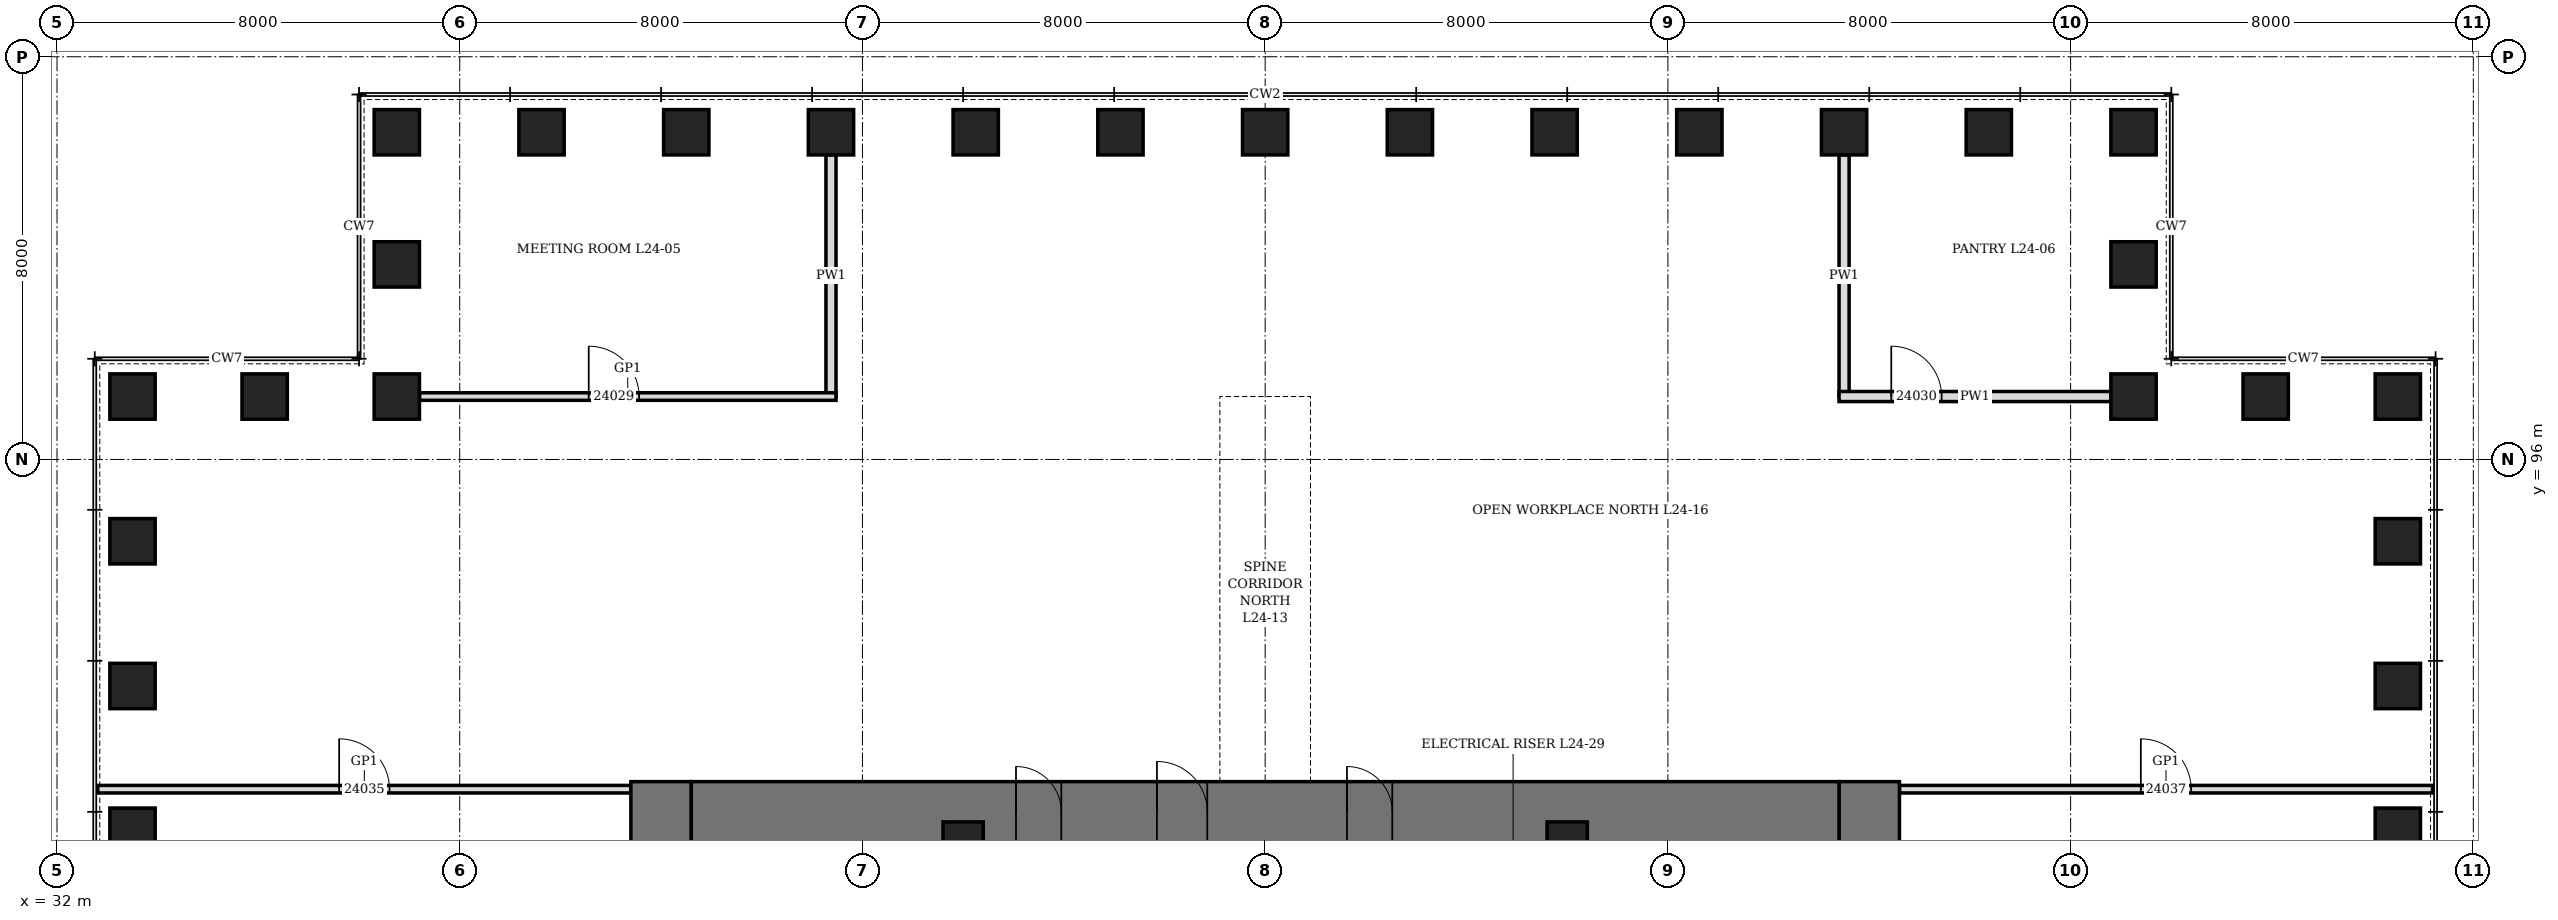
"""IFC4 building model, lengths in metres.
Left out: names, types, materials, properties, quantities, classifications, styles, units other than length and angle.
Written with IfcOpenShell. Run it as: python <this file> out.ifc"""

import sys

from ifc_helpers import new_model, si_unit, direction, frame, frame_2d, origin, origin_2d, place, context, subcontext, project, spatial, rectangle, hollow_rectangle, extrude, element, fill, save


model = new_model("IFC4")
c1 = context("Model", 3, precision=1e-05, world=origin(), true_north=direction((0.0, 1.0)))
c2 = subcontext(c1, "Body", "Model", "MODEL_VIEW")
j1 = project(units=[si_unit("LENGTHUNIT", "METRE"), si_unit("PLANEANGLEUNIT", "RADIAN")], contexts=[c1])
p1 = place(None, origin())
s1 = spatial("IfcSite", under=j1, at=p1, CompositionType="ELEMENT")
p2 = place(p1, origin())
s2 = spatial("IfcBuilding", under=s1, at=p2, CompositionType="ELEMENT")
p3 = place(p2, frame((0.0, 0.0, 112.3)))
s3 = spatial("IfcBuildingStorey", under=s2, at=p3, CompositionType="ELEMENT", Elevation=112.3)
for number, where, z_axis, x_axis in (
    (1, (78.5, 88.625, 0.0), (0.0, 0.0, 1.0), (0.0, 1.0, 0.0)),
    (2, (78.5, 91.5, 0.0), (0.0, 0.0, 1.0), (0.0, 1.0, 0.0)),
    (3, (78.5, 94.375, 0.0), (0.0, 0.0, 1.0), (0.0, 1.0, 0.0)),
    (4, (78.5, 97.25, 0.0), (0.0, 0.0, 1.0), (1.0, 0.0, 0.0)),
    (5, (75.875, 97.25, 0.0), (0.0, 0.0, 1.0), (1.0, 0.0, 0.0)),
    (6, (73.25, 97.25, 0.0), (0.0, 0.0, 1.0), (0.0, 1.0, 0.0)),
    (7, (73.25, 99.875, 0.0), (0.0, 0.0, 1.0), (0.0, 1.0, 0.0)),
    (8, (73.25, 102.5, 0.0), (0.0, 0.0, 1.0), (1.0, 0.0, 0.0)),
    (9, (70.375, 102.5, 0.0), (0.0, 0.0, 1.0), (1.0, 0.0, 0.0)),
    (10, (67.5, 102.5, 0.0), (0.0, 0.0, 1.0), (1.0, 0.0, 0.0)),
    (11, (64.625, 102.5, 0.0), (0.0, 0.0, 1.0), (1.0, 0.0, 0.0)),
    (12, (61.75, 102.5, 0.0), (0.0, 0.0, 1.0), (1.0, 0.0, 0.0)),
    (13, (58.875, 102.5, 0.0), (0.0, 0.0, 1.0), (1.0, 0.0, 0.0)),
    (14, (56.0, 102.5, 0.0), (0.0, 0.0, 1.0), (1.0, 0.0, 0.0)),
    (15, (53.125, 102.5, 0.0), (0.0, 0.0, 1.0), (1.0, 0.0, 0.0)),
    (16, (50.25, 102.5, 0.0), (0.0, 0.0, 1.0), (1.0, 0.0, 0.0)),
    (17, (47.375, 102.5, 0.0), (0.0, 0.0, 1.0), (1.0, 0.0, 0.0)),
    (18, (44.5, 102.5, 0.0), (0.0, 0.0, 1.0), (1.0, 0.0, 0.0)),
    (19, (41.625, 102.5, 0.0), (0.0, 0.0, 1.0), (1.0, 0.0, 0.0)),
    (20, (38.75, 102.5, 0.0), (0.0, 0.0, 1.0), (0.0, 1.0, 0.0)),
    (21, (38.75, 99.875, 0.0), (0.0, 0.0, 1.0), (0.0, 1.0, 0.0)),
    (22, (38.75, 97.25, 0.0), (0.0, 0.0, 1.0), (1.0, 0.0, 0.0)),
    (23, (36.125, 97.25, 0.0), (0.0, 0.0, 1.0), (1.0, 0.0, 0.0)),
    (24, (33.5, 97.25, 0.0), (0.0, 0.0, 1.0), (0.0, 1.0, 0.0)),
    (25, (33.5, 94.375, 0.0), (0.0, 0.0, 1.0), (0.0, 1.0, 0.0)),
    (26, (33.5, 91.5, 0.0), (0.0, 0.0, 1.0), (0.0, 1.0, 0.0)),
    (27, (33.5, 88.625, 0.0), (0.0, 0.0, 1.0), (0.0, 1.0, 0.0)),
):
    element("IfcColumn", number, at=place(p3, frame(where, z_axis=z_axis, x_axis=x_axis)), inside=s3, PredefinedType="COLUMN", context=c2, shape_type="SweptSolid", body=[
        extrude(hollow_rectangle(XDim=0.9, YDim=0.9, WallThickness=0.15, at=origin_2d()), origin(), (0.0, 0.0, 1.0), 4.2),
    ])
p4 = place(p3, frame((44.0, 70.4, 0.0), z_axis=(0.0, 0.0, 1.0), x_axis=(0.0, 1.0, 0.0)))
e28 = element("IfcWall", 28, at=p4, inside=s3, PredefinedType="SHEAR", context=c2, shape_type="SweptSolid", body=[
    extrude(rectangle(XDim=19.2, YDim=1.2, at=frame_2d((9.6, 0.0))), origin(), (0.0, 0.0, 1.0), 4.2),
])
p5 = place(p4, frame((8.6, 0.0, 0.0)))
e29 = element("IfcOpeningElement", 29, at=p5, cuts=e28, PredefinedType="OPENING", context=c2, shape_type="SweptSolid", body=[
    extrude(rectangle(XDim=2.0, YDim=2.4, at=frame_2d((1.0, 1.2))), frame((0.0, 0.61, 0.0), z_axis=(0.0, -1.0, 0.0), x_axis=(1.0, 0.0, 0.0)), (0.0, 0.0, 1.0), 1.22),
])
p6 = place(p3, frame((68.0, 70.4, 0.0), z_axis=(0.0, 0.0, 1.0), x_axis=(0.0, 1.0, 0.0)))
e30 = element("IfcWall", 30, at=p6, inside=s3, PredefinedType="SHEAR", context=c2, shape_type="SweptSolid", body=[
    extrude(rectangle(XDim=19.2, YDim=1.2, at=frame_2d((9.6, 0.0))), origin(), (0.0, 0.0, 1.0), 4.2),
])
p7 = place(p6, frame((8.6, 0.0, 0.0)))
e31 = element("IfcOpeningElement", 31, at=p7, cuts=e30, PredefinedType="OPENING", context=c2, shape_type="SweptSolid", body=[
    extrude(rectangle(XDim=2.0, YDim=2.4, at=frame_2d((1.0, 1.2))), frame((0.0, 0.61, 0.0), z_axis=(0.0, -1.0, 0.0), x_axis=(1.0, 0.0, 0.0)), (0.0, 0.0, 1.0), 1.22),
])
p8 = place(p3, frame((44.6, 89.0, 0.0), z_axis=(0.0, 0.0, 1.0), x_axis=(1.0, 0.0, 0.0)))
e32 = element("IfcWall", 32, at=p8, inside=s3, PredefinedType="SHEAR", context=c2, shape_type="SweptSolid", body=[
    extrude(rectangle(XDim=22.8, YDim=1.2, at=frame_2d((11.4, 0.0))), origin(), (0.0, 0.0, 1.0), 4.2),
])
p9 = place(p8, frame((9.25, 0.0, 0.0)))
e33 = element("IfcOpeningElement", 33, at=p9, cuts=e32, PredefinedType="OPENING", context=c2, shape_type="SweptSolid", body=[
    extrude(rectangle(XDim=1.0, YDim=2.1, at=frame_2d((0.5, 1.05))), frame((0.0, 0.61, 0.0), z_axis=(0.0, -1.0, 0.0), x_axis=(1.0, 0.0, 0.0)), (0.0, 0.0, 1.0), 1.22),
])
p10 = place(p8, frame((6.45, 0.0, 0.0)))
e34 = element("IfcOpeningElement", 34, at=p10, cuts=e32, PredefinedType="OPENING", context=c2, shape_type="SweptSolid", body=[
    extrude(rectangle(XDim=0.9, YDim=2.1, at=frame_2d((0.45, 1.05))), frame((0.0, 0.61, 0.0), z_axis=(0.0, -1.0, 0.0), x_axis=(1.0, 0.0, 0.0)), (0.0, 0.0, 1.0), 1.22),
])
p11 = place(p8, frame((13.025, 0.0, 0.0)))
e35 = element("IfcOpeningElement", 35, at=p11, cuts=e32, PredefinedType="OPENING", context=c2, shape_type="SweptSolid", body=[
    extrude(rectangle(XDim=0.9, YDim=2.1, at=frame_2d((0.45, 1.05))), frame((0.0, 0.61, 0.0), z_axis=(0.0, -1.0, 0.0), x_axis=(1.0, 0.0, 0.0)), (0.0, 0.0, 1.0), 1.22),
])
for number, where, z_axis, x_axis in (
    (36, (50.0, 88.4, 0.0), (0.0, 0.0, 1.0), (1.0, 0.0, 0.0)),
    (37, (62.0, 88.4, 0.0), (0.0, 0.0, 1.0), (1.0, 0.0, 0.0)),
):
    element("IfcColumn", number, at=place(p3, frame(where, z_axis=z_axis, x_axis=x_axis)), inside=s3, PredefinedType="COLUMN", context=c2, shape_type="SweptSolid", body=[
        extrude(hollow_rectangle(XDim=0.8, YDim=0.8, WallThickness=0.1, at=origin_2d()), origin(), (0.0, 0.0, 1.0), 4.2),
    ])
p12 = place(p3, frame((47.375, 97.25, 0.0), z_axis=(0.0, 0.0, 1.0), x_axis=(0.0, 1.0, 0.0)))
e38 = element("IfcWall", 38, at=p12, inside=s3, PredefinedType="PARTITIONING", context=c2, shape_type="SweptSolid", body=[
    extrude(rectangle(XDim=4.8, YDim=0.2, at=frame_2d((2.4, 0.0))), origin(), (0.0, 0.0, 1.0), 3.278),
])
p13 = place(p3, frame((67.5, 97.25, 0.0), z_axis=(0.0, 0.0, 1.0), x_axis=(0.0, 1.0, 0.0)))
e39 = element("IfcWall", 39, at=p13, inside=s3, PredefinedType="PARTITIONING", context=c2, shape_type="SweptSolid", body=[
    extrude(rectangle(XDim=4.8, YDim=0.2, at=frame_2d((2.4, 0.0))), origin(), (0.0, 0.0, 1.0), 2.74),
])
p14 = place(p3, frame((32.81, 89.45, 0.0), z_axis=(0.0, 0.0, 1.0), x_axis=(1.0, 0.0, 0.0)))
e40 = element("IfcWall", 40, at=p14, inside=s3, PredefinedType="PARTITIONING", context=c2, shape_type="SweptSolid", body=[
    extrude(rectangle(XDim=10.59, YDim=0.15, at=frame_2d((5.295, 0.0))), origin(), (0.0, 0.0, 1.0), 4.04),
])
p15 = place(p14, frame((4.795, 0.0, 0.0)))
e41 = element("IfcOpeningElement", 41, at=p15, cuts=e40, PredefinedType="OPENING", context=c2, shape_type="SweptSolid", body=[
    extrude(rectangle(XDim=1.0, YDim=2.4, at=frame_2d((0.5, 1.2))), frame((0.0, 0.085, 0.0), z_axis=(0.0, -1.0, 0.0), x_axis=(1.0, 0.0, 0.0)), (0.0, 0.0, 1.0), 0.17),
])
p16 = place(p3, frame((68.6, 89.45, 0.0), z_axis=(0.0, 0.0, 1.0), x_axis=(1.0, 0.0, 0.0)))
e42 = element("IfcWall", 42, at=p16, inside=s3, PredefinedType="PARTITIONING", context=c2, shape_type="SweptSolid", body=[
    extrude(rectangle(XDim=10.59, YDim=0.15, at=frame_2d((5.295, 0.0))), origin(), (0.0, 0.0, 1.0), 4.04),
])
p17 = place(p16, frame((4.795, 0.0, 0.0)))
e43 = element("IfcOpeningElement", 43, at=p17, cuts=e42, PredefinedType="OPENING", context=c2, shape_type="SweptSolid", body=[
    extrude(rectangle(XDim=1.0, YDim=2.4, at=frame_2d((0.5, 1.2))), frame((0.0, 0.085, 0.0), z_axis=(0.0, -1.0, 0.0), x_axis=(1.0, 0.0, 0.0)), (0.0, 0.0, 1.0), 0.17),
])
p18 = place(p3, frame((39.2, 97.25, 0.0), z_axis=(0.0, 0.0, 1.0), x_axis=(1.0, 0.0, 0.0)))
e44 = element("IfcWall", 44, at=p18, inside=s3, PredefinedType="PARTITIONING", context=c2, shape_type="SweptSolid", body=[
    extrude(rectangle(XDim=8.275, YDim=0.15, at=frame_2d((4.138, 0.0))), origin(), (0.0, 0.0, 1.0), 4.04),
])
p19 = place(p18, frame((3.363, 0.0, 0.0)))
e45 = element("IfcOpeningElement", 45, at=p19, cuts=e44, PredefinedType="OPENING", context=c2, shape_type="SweptSolid", body=[
    extrude(rectangle(XDim=1.0, YDim=2.4, at=frame_2d((0.5, 1.2))), frame((0.0, 0.085, 0.0), z_axis=(0.0, -1.0, 0.0), x_axis=(1.0, 0.0, 0.0)), (0.0, 0.0, 1.0), 0.17),
])
p20 = place(p3, frame((67.4, 97.25, 0.0), z_axis=(0.0, 0.0, 1.0), x_axis=(1.0, 0.0, 0.0)))
e46 = element("IfcWall", 46, at=p20, inside=s3, PredefinedType="PARTITIONING", context=c2, shape_type="SweptSolid", body=[
    extrude(rectangle(XDim=5.4, YDim=0.2, at=frame_2d((2.7, 0.0))), origin(), (0.0, 0.0, 1.0), 4.04),
])
p21 = place(p20, frame((1.038, 0.0, 0.0)))
e47 = element("IfcOpeningElement", 47, at=p21, cuts=e46, PredefinedType="OPENING", context=c2, shape_type="SweptSolid", body=[
    extrude(rectangle(XDim=1.0, YDim=2.1, at=frame_2d((0.5, 1.05))), frame((0.0, 0.11, 0.0), z_axis=(0.0, -1.0, 0.0), x_axis=(1.0, 0.0, 0.0)), (0.0, 0.0, 1.0), 0.22),
])
p22 = place(p9, origin())
e48 = element("IfcDoor", 48, at=p22, inside=s3, OperationType="SINGLE_SWING_LEFT", PredefinedType="DOOR", context=c2, shape_type="SweptSolid", body=[
    extrude(rectangle(XDim=1.0, YDim=2.1, at=frame_2d((0.5, 1.05))), frame((0.0, 0.35, 0.0), z_axis=(0.0, -1.0, 0.0), x_axis=(1.0, 0.0, 0.0)), (0.0, 0.0, 1.0), 0.7),
])
fill(e33, e48)
p23 = place(p10, origin())
e49 = element("IfcDoor", 49, at=p23, inside=s3, OperationType="SINGLE_SWING_LEFT", PredefinedType="DOOR", context=c2, shape_type="SweptSolid", body=[
    extrude(rectangle(XDim=0.9, YDim=2.1, at=frame_2d((0.45, 1.05))), frame((0.0, 0.35, 0.0), z_axis=(0.0, -1.0, 0.0), x_axis=(1.0, 0.0, 0.0)), (0.0, 0.0, 1.0), 0.7),
])
fill(e34, e49)
p24 = place(p11, origin())
e50 = element("IfcDoor", 50, at=p24, inside=s3, OperationType="SINGLE_SWING_LEFT", PredefinedType="DOOR", context=c2, shape_type="SweptSolid", body=[
    extrude(rectangle(XDim=0.9, YDim=2.1, at=frame_2d((0.45, 1.05))), frame((0.0, 0.35, 0.0), z_axis=(0.0, -1.0, 0.0), x_axis=(1.0, 0.0, 0.0)), (0.0, 0.0, 1.0), 0.7),
])
fill(e35, e50)
p25 = place(p19, origin())
e51 = element("IfcDoor", 51, at=p25, inside=s3, OperationType="SINGLE_SWING_RIGHT", PredefinedType="DOOR", context=c2, shape_type="SweptSolid", body=[
    extrude(rectangle(XDim=1.0, YDim=2.4, at=frame_2d((0.5, 1.2))), frame((0.0, 0.075, 0.0), z_axis=(0.0, -1.0, 0.0), x_axis=(1.0, 0.0, 0.0)), (0.0, 0.0, 1.0), 0.149),
])
fill(e45, e51)
p26 = place(p21, origin())
e52 = element("IfcDoor", 52, at=p26, inside=s3, OperationType="SINGLE_SWING_LEFT", PredefinedType="DOOR", context=c2, shape_type="SweptSolid", body=[
    extrude(rectangle(XDim=1.0, YDim=2.1, at=frame_2d((0.5, 1.05))), frame((0.0, 0.1, 0.0), z_axis=(0.0, -1.0, 0.0), x_axis=(1.0, 0.0, 0.0)), (0.0, 0.0, 1.0), 0.199),
])
fill(e47, e52)
p27 = place(p15, origin())
e53 = element("IfcDoor", 53, at=p27, inside=s3, OperationType="SINGLE_SWING_RIGHT", PredefinedType="DOOR", context=c2, shape_type="SweptSolid", body=[
    extrude(rectangle(XDim=1.0, YDim=2.4, at=frame_2d((0.5, 1.2))), frame((0.0, 0.075, 0.0), z_axis=(0.0, -1.0, 0.0), x_axis=(1.0, 0.0, 0.0)), (0.0, 0.0, 1.0), 0.149),
])
fill(e41, e53)
p28 = place(p17, origin())
e54 = element("IfcDoor", 54, at=p28, inside=s3, OperationType="SINGLE_SWING_RIGHT", PredefinedType="DOOR", context=c2, shape_type="SweptSolid", body=[
    extrude(rectangle(XDim=1.0, YDim=2.4, at=frame_2d((0.5, 1.2))), frame((0.0, 0.075, 0.0), z_axis=(0.0, -1.0, 0.0), x_axis=(1.0, 0.0, 0.0)), (0.0, 0.0, 1.0), 0.149),
])
fill(e43, e54)
save(model, sys.argv[1])
